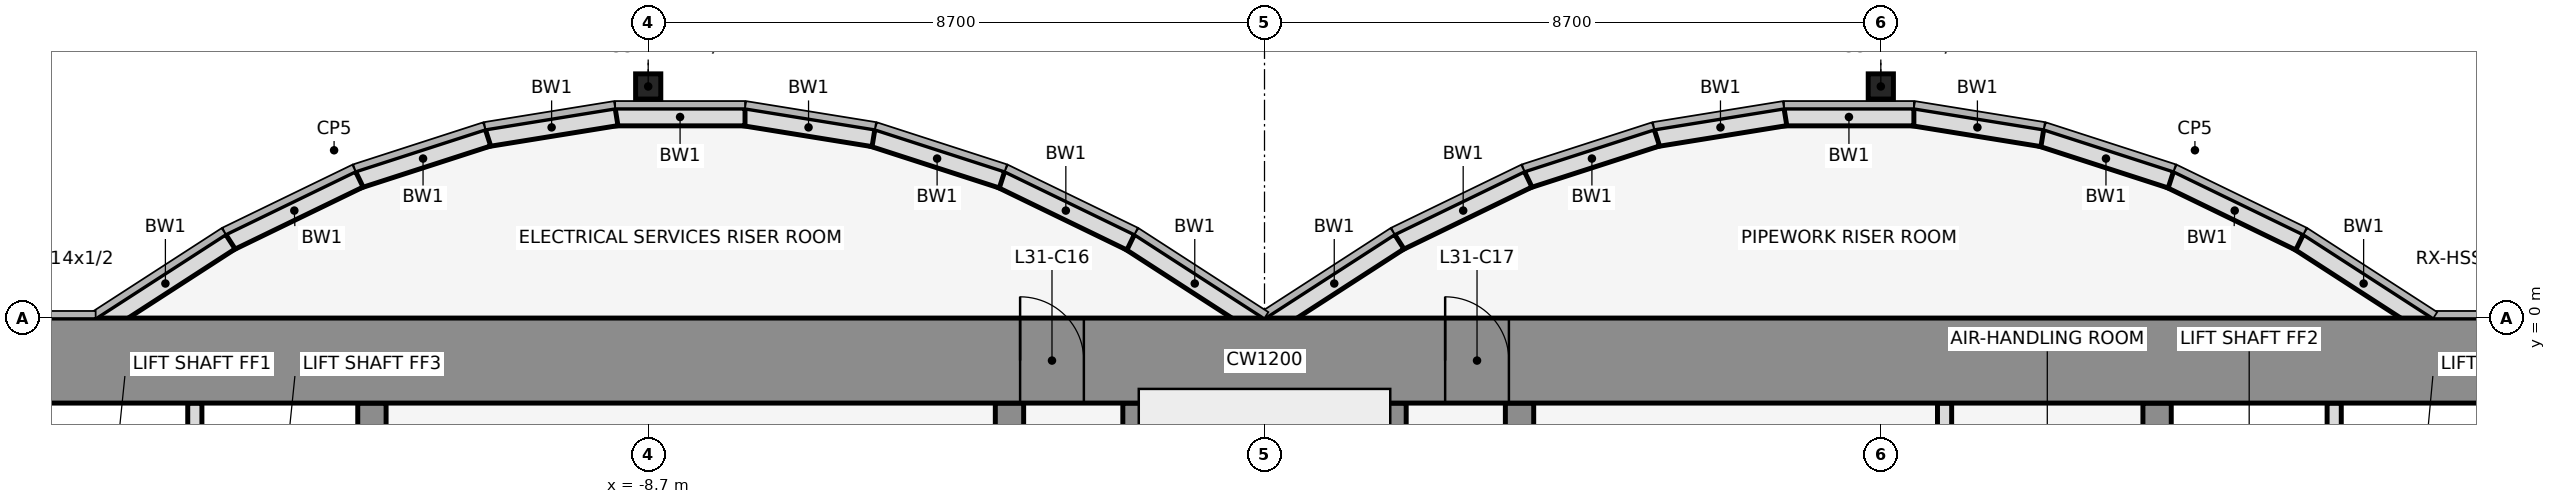
"""IFC4 building model, lengths in metres.
Left out: names, types, materials, properties, quantities, classifications, styles, units other than length and angle.
Written with IfcOpenShell. Run it as: python <this file> out.ifc"""

import sys

from ifc_helpers import new_model, si_unit, direction, frame, frame_2d, origin, origin_2d, place, context, subcontext, project, spatial, rectangle, hollow_rectangle, extrude, element, fill, save


model = new_model("IFC4")
c1 = context("Model", 3, precision=1e-05, world=origin(), true_north=direction((0.0, 1.0)))
c2 = subcontext(c1, "Body", "Model", "MODEL_VIEW")
j1 = project(units=[si_unit("LENGTHUNIT", "METRE"), si_unit("PLANEANGLEUNIT", "RADIAN")], contexts=[c1])
p1 = place(None, origin())
s1 = spatial("IfcSite", under=j1, at=p1, CompositionType="ELEMENT")
p2 = place(p1, origin())
s2 = spatial("IfcBuilding", under=s1, at=p2, CompositionType="ELEMENT")
p3 = place(p2, frame((0.0, 0.0, 144.5)))
s3 = spatial("IfcBuildingStorey", under=s2, at=p3, CompositionType="ELEMENT", Elevation=144.5)
for number, where, z_axis, x_axis in (
    (1, (-8.7, 3.269, 0.0), (0.0, 0.0, 1.0), (1.0, 0.0, 0.0)),
    (2, (8.7, 3.269, 0.0), (0.0, 0.0, 1.0), (1.0, 0.0, 0.0)),
):
    element("IfcColumn", number, at=place(p3, frame(where, z_axis=z_axis, x_axis=x_axis)), inside=s3, PredefinedType="COLUMN", context=c2, shape_type="SweptSolid", body=[
        extrude(hollow_rectangle(XDim=0.356, YDim=0.356, WallThickness=0.012, at=origin_2d()), origin(), (0.0, 0.0, 1.0), 4.1),
    ])
p4 = place(p3, frame((16.432, -0.105, 0.0), z_axis=(0.0, 0.0, 1.0), x_axis=(-0.83981312244, 0.542875602121, 0.0)))
e3 = element("IfcWall", 3, at=p4, inside=s3, PredefinedType="STANDARD", context=c2, shape_type="SweptSolid", body=[
    extrude(rectangle(XDim=2.183, YDim=0.25, at=frame_2d((1.091, 0.0))), origin(), (0.0, 0.0, 1.0), 3.95),
])
p5 = place(p3, frame((14.612, 1.073, 0.0), z_axis=(0.0, 0.0, 1.0), x_axis=(-0.89982408427, 0.436252928206, 0.0)))
e4 = element("IfcWall", 4, at=p5, inside=s3, PredefinedType="STANDARD", context=c2, shape_type="SweptSolid", body=[
    extrude(rectangle(XDim=2.038, YDim=0.25, at=frame_2d((1.019, 0.0))), origin(), (0.0, 0.0, 1.0), 3.95),
])
p6 = place(p3, frame((12.795, 1.955, 0.0), z_axis=(0.0, 0.0, 1.0), x_axis=(-0.951495806175, 0.307661714928, 0.0)))
e5 = element("IfcWall", 5, at=p6, inside=s3, PredefinedType="STANDARD", context=c2, shape_type="SweptSolid", body=[
    extrude(rectangle(XDim=1.927, YDim=0.25, at=frame_2d((0.963, 0.0))), origin(), (0.0, 0.0, 1.0), 3.95),
])
p7 = place(p3, frame((10.98, 2.543, 0.0), z_axis=(0.0, 0.0, 1.0), x_axis=(-0.987181718931, 0.159600293885, 0.0)))
e6 = element("IfcWall", 6, at=p7, inside=s3, PredefinedType="STANDARD", context=c2, shape_type="SweptSolid", body=[
    extrude(rectangle(XDim=1.857, YDim=0.25, at=frame_2d((0.929, 0.0))), origin(), (0.0, 0.0, 1.0), 3.95),
])
p8 = place(p3, frame((9.167, 2.838, 0.0), z_axis=(0.0, 0.0, 1.0), x_axis=(-1.0, 0.0, 0.0)))
e7 = element("IfcWall", 7, at=p8, inside=s3, PredefinedType="STANDARD", context=c2, shape_type="SweptSolid", body=[
    extrude(rectangle(XDim=1.833, YDim=0.25, at=frame_2d((0.917, 0.0))), origin(), (0.0, 0.0, 1.0), 3.95),
])
p9 = place(p3, frame((7.353, 2.84, 0.0), z_axis=(0.0, 0.0, 1.0), x_axis=(-0.987181718931, -0.159600293885, 0.0)))
e8 = element("IfcWall", 8, at=p9, inside=s3, PredefinedType="STANDARD", context=c2, shape_type="SweptSolid", body=[
    extrude(rectangle(XDim=1.857, YDim=0.25, at=frame_2d((0.929, 0.0))), origin(), (0.0, 0.0, 1.0), 3.95),
])
p10 = place(p3, frame((5.538, 2.548, 0.0), z_axis=(0.0, 0.0, 1.0), x_axis=(-0.951495806175, -0.307661714928, 0.0)))
e9 = element("IfcWall", 9, at=p10, inside=s3, PredefinedType="STANDARD", context=c2, shape_type="SweptSolid", body=[
    extrude(rectangle(XDim=1.927, YDim=0.25, at=frame_2d((0.963, 0.0))), origin(), (0.0, 0.0, 1.0), 3.95),
])
p11 = place(p3, frame((3.721, 1.962, 0.0), z_axis=(0.0, 0.0, 1.0), x_axis=(-0.89982408427, -0.436252928206, 0.0)))
e10 = element("IfcWall", 10, at=p11, inside=s3, PredefinedType="STANDARD", context=c2, shape_type="SweptSolid", body=[
    extrude(rectangle(XDim=2.038, YDim=0.25, at=frame_2d((1.019, 0.0))), origin(), (0.0, 0.0, 1.0), 3.95),
])
for number, where, z_axis, x_axis in (
    (11, (1.901, 1.08, 0.0), (0.0, 0.0, 1.0), (-0.84, -0.543, 0.0)),
    (12, (-0.068, -0.105, 0.0), (0.0, 0.0, 1.0), (-0.84, 0.543, 0.0)),
):
    element("IfcWall", number, at=place(p3, frame(where, z_axis=z_axis, x_axis=x_axis)), inside=s3, PredefinedType="STANDARD", context=c2, shape_type="SweptSolid", body=[
        extrude(rectangle(XDim=2.183, YDim=0.25, at=frame_2d((1.091, 0.0))), origin(), (0.0, 0.0, 1.0), 3.95),
    ])
p12 = place(p3, frame((-1.888, 1.073, 0.0), z_axis=(0.0, 0.0, 1.0), x_axis=(-0.89982408427, 0.436252928206, 0.0)))
e13 = element("IfcWall", 13, at=p12, inside=s3, PredefinedType="STANDARD", context=c2, shape_type="SweptSolid", body=[
    extrude(rectangle(XDim=2.038, YDim=0.25, at=frame_2d((1.019, 0.0))), origin(), (0.0, 0.0, 1.0), 3.95),
])
p13 = place(p3, frame((-3.705, 1.955, 0.0), z_axis=(0.0, 0.0, 1.0), x_axis=(-0.951495806175, 0.307661714928, 0.0)))
e14 = element("IfcWall", 14, at=p13, inside=s3, PredefinedType="STANDARD", context=c2, shape_type="SweptSolid", body=[
    extrude(rectangle(XDim=1.927, YDim=0.25, at=frame_2d((0.963, 0.0))), origin(), (0.0, 0.0, 1.0), 3.95),
])
p14 = place(p3, frame((-5.52, 2.543, 0.0), z_axis=(0.0, 0.0, 1.0), x_axis=(-0.987181718931, 0.159600293885, 0.0)))
e15 = element("IfcWall", 15, at=p14, inside=s3, PredefinedType="STANDARD", context=c2, shape_type="SweptSolid", body=[
    extrude(rectangle(XDim=1.857, YDim=0.25, at=frame_2d((0.929, 0.0))), origin(), (0.0, 0.0, 1.0), 3.95),
])
p15 = place(p3, frame((-7.333, 2.838, 0.0), z_axis=(0.0, 0.0, 1.0), x_axis=(-1.0, 0.0, 0.0)))
e16 = element("IfcWall", 16, at=p15, inside=s3, PredefinedType="STANDARD", context=c2, shape_type="SweptSolid", body=[
    extrude(rectangle(XDim=1.833, YDim=0.25, at=frame_2d((0.917, 0.0))), origin(), (0.0, 0.0, 1.0), 3.95),
])
p16 = place(p3, frame((-9.147, 2.84, 0.0), z_axis=(0.0, 0.0, 1.0), x_axis=(-0.987181718931, -0.159600293885, 0.0)))
e17 = element("IfcWall", 17, at=p16, inside=s3, PredefinedType="STANDARD", context=c2, shape_type="SweptSolid", body=[
    extrude(rectangle(XDim=1.857, YDim=0.25, at=frame_2d((0.929, 0.0))), origin(), (0.0, 0.0, 1.0), 3.95),
])
p17 = place(p3, frame((-10.962, 2.548, 0.0), z_axis=(0.0, 0.0, 1.0), x_axis=(-0.951495806175, -0.307661714928, 0.0)))
e18 = element("IfcWall", 18, at=p17, inside=s3, PredefinedType="STANDARD", context=c2, shape_type="SweptSolid", body=[
    extrude(rectangle(XDim=1.927, YDim=0.25, at=frame_2d((0.963, 0.0))), origin(), (0.0, 0.0, 1.0), 3.95),
])
p18 = place(p3, frame((-12.779, 1.962, 0.0), z_axis=(0.0, 0.0, 1.0), x_axis=(-0.89982408427, -0.436252928206, 0.0)))
e19 = element("IfcWall", 19, at=p18, inside=s3, PredefinedType="STANDARD", context=c2, shape_type="SweptSolid", body=[
    extrude(rectangle(XDim=2.038, YDim=0.25, at=frame_2d((1.019, 0.0))), origin(), (0.0, 0.0, 1.0), 3.95),
])
p19 = place(p3, frame((-14.599, 1.08, 0.0), z_axis=(0.0, 0.0, 1.0), x_axis=(-0.83981312244, -0.542875602121, 0.0)))
e20 = element("IfcWall", 20, at=p19, inside=s3, PredefinedType="STANDARD", context=c2, shape_type="SweptSolid", body=[
    extrude(rectangle(XDim=2.183, YDim=0.25, at=frame_2d((1.091, 0.0))), origin(), (0.0, 0.0, 1.0), 3.95),
])
p20 = place(p3, frame((-15.1, -4.6, 0.0), z_axis=(0.0, 0.0, 1.0), x_axis=(0.0, 1.0, 0.0)))
e21 = element("IfcWall", 21, at=p20, inside=s3, PredefinedType="PARTITIONING", context=c2, shape_type="SweptSolid", body=[
    extrude(rectangle(XDim=3.4, YDim=0.2, at=frame_2d((1.7, 0.0))), origin(), (0.0, 0.0, 1.0), 2.84),
])
p21 = place(p3, frame((-12.6, -11.8, 0.0), z_axis=(0.0, 0.0, 1.0), x_axis=(0.0, 1.0, 0.0)))
e22 = element("IfcWall", 22, at=p21, inside=s3, PredefinedType="SHEAR", context=c2, shape_type="SweptSolid", body=[
    extrude(rectangle(XDim=10.6, YDim=0.4, at=frame_2d((5.3, 0.0))), origin(), (0.0, 0.0, 1.0), 4.1),
])
p22 = place(p21, frame((4.75, 0.0, 0.0)))
e23 = element("IfcOpeningElement", 23, at=p22, cuts=e22, PredefinedType="OPENING", context=c2, shape_type="SweptSolid", body=[
    extrude(rectangle(XDim=1.1, YDim=2.1, at=frame_2d((0.55, 1.05))), frame((0.0, 0.212, 0.0), z_axis=(0.0, -1.0, 0.0), x_axis=(1.0, 0.0, 0.0)), (0.0, 0.0, 1.0), 0.424),
])
p23 = place(p3, frame((-3.6, -11.8, 0.0), z_axis=(0.0, 0.0, 1.0), x_axis=(0.0, 1.0, 0.0)))
e24 = element("IfcWall", 24, at=p23, inside=s3, PredefinedType="SHEAR", context=c2, shape_type="SweptSolid", body=[
    extrude(rectangle(XDim=10.6, YDim=0.4, at=frame_2d((5.3, 0.0))), origin(), (0.0, 0.0, 1.0), 4.1),
])
p24 = place(p23, frame((4.85, 0.0, 0.0)))
e25 = element("IfcOpeningElement", 25, at=p24, cuts=e24, PredefinedType="OPENING", context=c2, shape_type="SweptSolid", body=[
    extrude(rectangle(XDim=0.9, YDim=2.1, at=frame_2d((0.45, 1.05))), frame((0.0, 0.212, 0.0), z_axis=(0.0, -1.0, 0.0), x_axis=(1.0, 0.0, 0.0)), (0.0, 0.0, 1.0), 0.424),
])
for number, where, z_axis, x_axis in (
    (26, (-1.8, -11.8, 0.0), (0.0, 0.0, 1.0), (0.0, 1.0, 0.0)),
    (27, (1.8, -11.8, 0.0), (0.0, 0.0, 1.0), (0.0, 1.0, 0.0)),
):
    element("IfcWall", number, at=place(p3, frame(where, z_axis=z_axis, x_axis=x_axis)), inside=s3, PredefinedType="SHEAR", context=c2, shape_type="SweptSolid", body=[
        extrude(rectangle(XDim=10.6, YDim=0.4, at=frame_2d((5.3, 0.0))), origin(), (0.0, 0.0, 1.0), 4.1),
    ])
p25 = place(p3, frame((3.6, -11.8, 0.0), z_axis=(0.0, 0.0, 1.0), x_axis=(0.0, 1.0, 0.0)))
e28 = element("IfcWall", 28, at=p25, inside=s3, PredefinedType="SHEAR", context=c2, shape_type="SweptSolid", body=[
    extrude(rectangle(XDim=10.6, YDim=0.4, at=frame_2d((5.3, 0.0))), origin(), (0.0, 0.0, 1.0), 4.1),
])
p26 = place(p25, frame((1.35, 0.0, 0.0)))
e29 = element("IfcOpeningElement", 29, at=p26, cuts=e28, PredefinedType="OPENING", context=c2, shape_type="SweptSolid", body=[
    extrude(rectangle(XDim=0.9, YDim=2.1, at=frame_2d((0.45, 1.05))), frame((0.0, 0.212, 0.0), z_axis=(0.0, -1.0, 0.0), x_axis=(1.0, 0.0, 0.0)), (0.0, 0.0, 1.0), 0.424),
])
p27 = place(p3, frame((9.6, -4.6, 0.0), z_axis=(0.0, 0.0, 1.0), x_axis=(0.0, 1.0, 0.0)))
e30 = element("IfcWall", 30, at=p27, inside=s3, PredefinedType="PARTITIONING", context=c2, shape_type="SweptSolid", body=[
    extrude(rectangle(XDim=3.4, YDim=0.2, at=frame_2d((1.7, 0.0))), origin(), (0.0, 0.0, 1.0), 2.84),
])
p28 = place(p3, frame((12.6, -11.8, 0.0), z_axis=(0.0, 0.0, 1.0), x_axis=(0.0, 1.0, 0.0)))
e31 = element("IfcWall", 31, at=p28, inside=s3, PredefinedType="SHEAR", context=c2, shape_type="SweptSolid", body=[
    extrude(rectangle(XDim=10.6, YDim=0.4, at=frame_2d((5.3, 0.0))), origin(), (0.0, 0.0, 1.0), 4.1),
])
p29 = place(p28, frame((1.25, 0.0, 0.0)))
e32 = element("IfcOpeningElement", 32, at=p29, cuts=e31, PredefinedType="OPENING", context=c2, shape_type="SweptSolid", body=[
    extrude(rectangle(XDim=1.2, YDim=2.1, at=frame_2d((0.6, 1.05))), frame((0.0, 0.212, 0.0), z_axis=(0.0, -1.0, 0.0), x_axis=(1.0, 0.0, 0.0)), (0.0, 0.0, 1.0), 0.424),
])
p30 = place(p28, frame((4.75, 0.0, 0.0)))
e33 = element("IfcOpeningElement", 33, at=p30, cuts=e31, PredefinedType="OPENING", context=c2, shape_type="SweptSolid", body=[
    extrude(rectangle(XDim=1.1, YDim=2.1, at=frame_2d((0.55, 1.05))), frame((0.0, 0.212, 0.0), z_axis=(0.0, -1.0, 0.0), x_axis=(1.0, 0.0, 0.0)), (0.0, 0.0, 1.0), 0.424),
])
p31 = place(p3, frame((15.1, -4.6, 0.0), z_axis=(0.0, 0.0, 1.0), x_axis=(0.0, 1.0, 0.0)))
e34 = element("IfcWall", 34, at=p31, inside=s3, PredefinedType="PARTITIONING", context=c2, shape_type="SweptSolid", body=[
    extrude(rectangle(XDim=3.4, YDim=0.2, at=frame_2d((1.7, 0.0))), origin(), (0.0, 0.0, 1.0), 2.84),
])
p32 = place(p3, frame((-22.0, -0.6, 0.0), z_axis=(0.0, 0.0, 1.0), x_axis=(1.0, 0.0, 0.0)))
e35 = element("IfcWall", 35, at=p32, inside=s3, PredefinedType="SHEAR", context=c2, shape_type="SweptSolid", body=[
    extrude(rectangle(XDim=44.0, YDim=1.2, at=frame_2d((22.0, 0.0))), origin(), (0.0, 0.0, 1.0), 4.1),
])
p33 = place(p32, frame((18.55, 0.0, 0.0)))
e36 = element("IfcOpeningElement", 36, at=p33, cuts=e35, PredefinedType="OPENING", context=c2, shape_type="SweptSolid", body=[
    extrude(rectangle(XDim=0.9, YDim=2.1, at=frame_2d((0.45, 1.05))), frame((0.0, 0.612, 0.0), z_axis=(0.0, -1.0, 0.0), x_axis=(1.0, 0.0, 0.0)), (0.0, 0.0, 1.0), 1.224),
])
p34 = place(p32, frame((24.55, 0.0, 0.0)))
e37 = element("IfcOpeningElement", 37, at=p34, cuts=e35, PredefinedType="OPENING", context=c2, shape_type="SweptSolid", body=[
    extrude(rectangle(XDim=0.9, YDim=2.1, at=frame_2d((0.45, 1.05))), frame((0.0, 0.612, 0.0), z_axis=(0.0, -1.0, 0.0), x_axis=(1.0, 0.0, 0.0)), (0.0, 0.0, 1.0), 1.224),
])
p35 = place(p33, origin())
e38 = element("IfcDoor", 38, at=p35, inside=s3, OperationType="SINGLE_SWING_LEFT", PredefinedType="DOOR", context=c2, shape_type="SweptSolid", body=[
    extrude(rectangle(XDim=0.9, YDim=2.1, at=frame_2d((0.45, 1.05))), frame((0.0, 0.025, 0.0), z_axis=(0.0, -1.0, 0.0), x_axis=(1.0, 0.0, 0.0)), (0.0, 0.0, 1.0), 0.05),
])
fill(e36, e38)
p36 = place(p34, origin())
e39 = element("IfcDoor", 39, at=p36, inside=s3, OperationType="SINGLE_SWING_LEFT", PredefinedType="DOOR", context=c2, shape_type="SweptSolid", body=[
    extrude(rectangle(XDim=0.9, YDim=2.1, at=frame_2d((0.45, 1.05))), frame((0.0, 0.025, 0.0), z_axis=(0.0, -1.0, 0.0), x_axis=(1.0, 0.0, 0.0)), (0.0, 0.0, 1.0), 0.05),
])
fill(e37, e39)
save(model, sys.argv[1])
